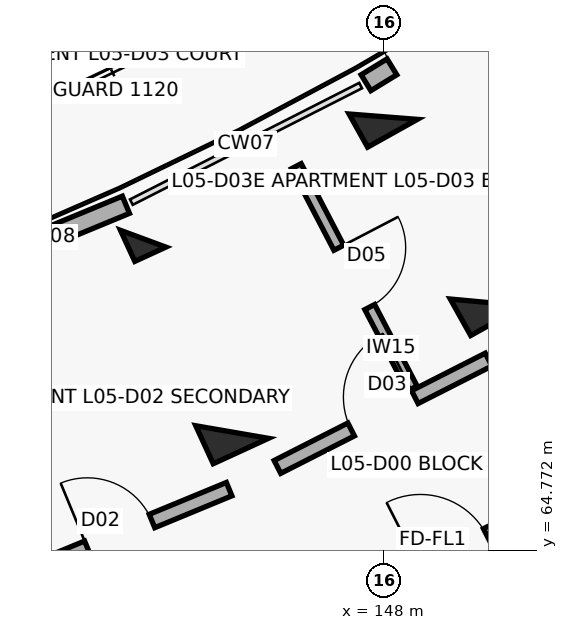
"""IFC4 building model, lengths in metres.
Left out: names, types, materials, properties, quantities, classifications, styles, units other than length and angle.
Written with IfcOpenShell. Run it as: python <this file> out.ifc"""

import sys

from ifc_helpers import new_model, si_unit, direction, frame, frame_2d, origin, origin_2d, place, context, subcontext, project, spatial, rectangle, extrude, element, fill, save


model = new_model("IFC4")
c1 = context("Model", 3, precision=1e-05, world=origin(), true_north=direction((0.0, 1.0)))
c2 = subcontext(c1, "Body", "Model", "MODEL_VIEW")
j1 = project(units=[si_unit("LENGTHUNIT", "METRE"), si_unit("PLANEANGLEUNIT", "RADIAN")], contexts=[c1])
p1 = place(None, origin())
s1 = spatial("IfcSite", under=j1, at=p1, CompositionType="ELEMENT")
p2 = place(p1, origin())
s2 = spatial("IfcBuilding", under=s1, at=p2, CompositionType="ELEMENT")
p3 = place(p2, frame((0.0, 0.0, 17.4)))
s3 = spatial("IfcBuildingStorey", under=s2, at=p3, CompositionType="ELEMENT", Elevation=17.4)
p4 = place(p3, frame((144.834, 68.868, 0.0), z_axis=(0.0, 0.0, 1.0), x_axis=(0.417867073801, -0.908508177527, 0.0)))
e1 = element("IfcColumn", 1, at=p4, inside=s3, PredefinedType="COLUMN", context=c2, shape_type="SweptSolid", body=[
    extrude(rectangle(XDim=0.45, YDim=0.45, at=origin_2d()), origin(), (0.0, 0.0, 1.0), 3.1),
])
p5 = place(p3, frame((146.004, 66.324, 0.0), z_axis=(0.0, 0.0, 1.0), x_axis=(0.417867073801, -0.908508177527, 0.0)))
e2 = element("IfcColumn", 2, at=p5, inside=s3, PredefinedType="COLUMN", context=c2, shape_type="SweptSolid", body=[
    extrude(rectangle(XDim=0.55, YDim=0.8, at=origin_2d()), origin(), (0.0, 0.0, 1.0), 3.1),
])
p6 = place(p3, frame((147.992, 70.474, 0.0), z_axis=(0.0, 0.0, 1.0), x_axis=(0.487859659139, -0.87292207727, 0.0)))
e3 = element("IfcColumn", 3, at=p6, inside=s3, PredefinedType="COLUMN", context=c2, shape_type="SweptSolid", body=[
    extrude(rectangle(XDim=0.5, YDim=0.75, at=origin_2d()), origin(), (0.0, 0.0, 1.0), 3.1),
])
p7 = place(p3, frame((149.358, 68.03, 0.0), z_axis=(0.0, 0.0, 1.0), x_axis=(0.487859659139, -0.87292207727, 0.0)))
e4 = element("IfcColumn", 4, at=p7, inside=s3, PredefinedType="COLUMN", context=c2, shape_type="SweptSolid", body=[
    extrude(rectangle(XDim=0.55, YDim=0.8, at=origin_2d()), origin(), (0.0, 0.0, 1.0), 3.1),
])
p8 = place(p3, frame((141.406, 67.992, 0.0), z_axis=(0.0, 0.0, 1.0), x_axis=(0.924221949388, 0.381855716561, 0.0)))
e5 = element("IfcWall", 5, at=p8, inside=s3, PredefinedType="SOLIDWALL", context=c2, shape_type="SweptSolid", body=[
    extrude(rectangle(XDim=3.463, YDim=0.245, at=frame_2d((1.732, 0.0))), origin(), (0.0, 0.0, 1.0), 2.25),
])
p9 = place(p8, frame((0.4, 0.0, 0.0)))
e6 = element("IfcOpeningElement", 6, at=p9, cuts=e5, PredefinedType="OPENING", context=c2, shape_type="SweptSolid", body=[
    extrude(rectangle(XDim=1.1, YDim=2.15, at=frame_2d((0.55, 1.075))), frame((0.0, 0.133, 0.0), z_axis=(0.0, -1.0, 0.0), x_axis=(1.0, 0.0, 0.0)), (0.0, 0.0, 1.0), 0.265),
])
p10 = place(p3, frame((147.765, 70.921, 0.0), z_axis=(0.0, 0.0, 1.0), x_axis=(0.85310231885, 0.521743647371, 0.0)))
e7 = element("IfcWall", 7, at=p10, inside=s3, PredefinedType="SOLIDWALL", context=c2, shape_type="SweptSolid", body=[
    extrude(rectangle(XDim=3.464, YDim=0.245, at=frame_2d((1.732, 0.0))), origin(), (0.0, 0.0, 1.0), 2.25),
])
p11 = place(p10, frame((0.4, 0.0, 0.0)))
e8 = element("IfcOpeningElement", 8, at=p11, cuts=e7, PredefinedType="OPENING", context=c2, shape_type="SweptSolid", body=[
    extrude(rectangle(XDim=1.1, YDim=2.15, at=frame_2d((0.55, 1.075))), frame((0.0, 0.133, 0.0), z_axis=(0.0, -1.0, 0.0), x_axis=(1.0, 0.0, 0.0)), (0.0, 0.0, 1.0), 0.265),
])
p12 = place(p3, frame((143.085, 64.383, 0.0), z_axis=(0.0, 0.0, 1.0), x_axis=(0.924213340202, 0.381876553081, 0.0)))
e9 = element("IfcWall", 9, at=p12, inside=s3, PredefinedType="SOLIDWALL", context=c2, shape_type="SweptSolid", body=[
    extrude(rectangle(XDim=3.116, YDim=0.19, at=frame_2d((1.558, 0.0))), origin(), (0.0, 0.0, 1.0), 2.08),
])
p13 = place(p12, frame((1.098, 0.0, 0.0)))
e10 = element("IfcOpeningElement", 10, at=p13, cuts=e9, PredefinedType="OPENING", context=c2, shape_type="SweptSolid", body=[
    extrude(rectangle(XDim=0.92, YDim=2.1, at=frame_2d((0.46, 1.05))), frame((0.0, 0.105, 0.0), z_axis=(0.0, -1.0, 0.0), x_axis=(1.0, 0.0, 0.0)), (0.0, 0.0, 1.0), 0.21),
])
p14 = place(p3, frame((147.457, 64.003, 0.0), z_axis=(0.0, 0.0, 1.0), x_axis=(0.891412167565, 0.45319349898, 0.0)))
e11 = element("IfcWall", 11, at=p14, inside=s3, PredefinedType="SOLIDWALL", context=c2, shape_type="SweptSolid", body=[
    extrude(rectangle(XDim=3.277, YDim=0.19, at=frame_2d((1.639, 0.0))), origin(), (0.0, 0.0, 1.0), 2.08),
])
p15 = place(p14, frame((1.148, 0.0, 0.0)))
e12 = element("IfcOpeningElement", 12, at=p15, cuts=e11, PredefinedType="OPENING", context=c2, shape_type="SweptSolid", body=[
    extrude(rectangle(XDim=0.98, YDim=2.15, at=frame_2d((0.49, 1.075))), frame((0.0, 0.105, 0.0), z_axis=(0.0, -1.0, 0.0), x_axis=(1.0, 0.0, 0.0)), (0.0, 0.0, 1.0), 0.21),
])
p16 = place(p3, frame((146.6, 65.865, 0.0), z_axis=(0.0, 0.0, 1.0), x_axis=(0.891414101388, 0.453189695212, 0.0)))
e13 = element("IfcWall", 13, at=p16, inside=s3, PredefinedType="SOLIDWALL", context=c2, shape_type="SweptSolid", body=[
    extrude(rectangle(XDim=3.116, YDim=0.19, at=frame_2d((1.558, 0.0))), origin(), (0.0, 0.0, 1.0), 2.08),
])
p17 = place(p16, frame((1.088, 0.0, 0.0)))
e14 = element("IfcOpeningElement", 14, at=p17, cuts=e13, PredefinedType="OPENING", context=c2, shape_type="SweptSolid", body=[
    extrude(rectangle(XDim=0.94, YDim=2.1, at=frame_2d((0.47, 1.05))), frame((0.0, 0.105, 0.0), z_axis=(0.0, -1.0, 0.0), x_axis=(1.0, 0.0, 0.0)), (0.0, 0.0, 1.0), 0.21),
])
p18 = place(p3, frame((146.849, 69.822, 0.0), z_axis=(0.0, 0.0, 1.0), x_axis=(0.462242343884, -0.886753638572, 0.0)))
e15 = element("IfcWall", 15, at=p18, inside=s3, PredefinedType="PARTITIONING", context=c2, shape_type="SweptSolid", body=[
    extrude(rectangle(XDim=3.3, YDim=0.145, at=frame_2d((1.65, 0.0))), origin(), (0.0, 0.0, 1.0), 2.08),
])
p19 = place(p18, frame((1.21, 0.0, 0.0)))
e16 = element("IfcOpeningElement", 16, at=p19, cuts=e15, PredefinedType="OPENING", context=c2, shape_type="SweptSolid", body=[
    extrude(rectangle(XDim=0.88, YDim=2.1, at=frame_2d((0.44, 1.05))), frame((0.0, 0.083, 0.0), z_axis=(0.0, -1.0, 0.0), x_axis=(1.0, 0.0, 0.0)), (0.0, 0.0, 1.0), 0.165),
])
p20 = place(p11, origin())
e17 = element("IfcDoor", 17, at=p20, inside=s3, OperationType="SINGLE_SWING_RIGHT", PredefinedType="DOOR", context=c2, shape_type="SweptSolid", body=[
    extrude(rectangle(XDim=1.1, YDim=2.15, at=frame_2d((0.55, 1.075))), frame((0.0, 0.025, 0.0), z_axis=(0.0, -1.0, 0.0), x_axis=(1.0, 0.0, 0.0)), (0.0, 0.0, 1.0), 0.05),
])
fill(e8, e17)
p21 = place(p13, origin())
e18 = element("IfcDoor", 18, at=p21, inside=s3, OperationType="SINGLE_SWING_LEFT", PredefinedType="DOOR", context=c2, shape_type="SweptSolid", body=[
    extrude(rectangle(XDim=0.92, YDim=2.1, at=frame_2d((0.46, 1.05))), frame((0.0, 0.025, 0.0), z_axis=(0.0, -1.0, 0.0), x_axis=(1.0, 0.0, 0.0)), (0.0, 0.0, 1.0), 0.05),
])
fill(e10, e18)
p22 = place(p15, origin())
e19 = element("IfcDoor", 19, at=p22, inside=s3, OperationType="SINGLE_SWING_LEFT", PredefinedType="DOOR", context=c2, shape_type="SweptSolid", body=[
    extrude(rectangle(XDim=0.98, YDim=2.15, at=frame_2d((0.49, 1.075))), frame((0.0, 0.025, 0.0), z_axis=(0.0, -1.0, 0.0), x_axis=(1.0, 0.0, 0.0)), (0.0, 0.0, 1.0), 0.05),
])
fill(e12, e19)
p23 = place(p17, origin())
e20 = element("IfcDoor", 20, at=p23, inside=s3, OperationType="SINGLE_SWING_RIGHT", PredefinedType="DOOR", context=c2, shape_type="SweptSolid", body=[
    extrude(rectangle(XDim=0.94, YDim=2.1, at=frame_2d((0.47, 1.05))), frame((0.0, 0.025, 0.0), z_axis=(0.0, -1.0, 0.0), x_axis=(1.0, 0.0, 0.0)), (0.0, 0.0, 1.0), 0.05),
])
fill(e14, e20)
p24 = place(p19, origin())
e21 = element("IfcDoor", 21, at=p24, inside=s3, OperationType="SINGLE_SWING_LEFT", PredefinedType="DOOR", context=c2, shape_type="SweptSolid", body=[
    extrude(rectangle(XDim=0.88, YDim=2.1, at=frame_2d((0.44, 1.05))), frame((0.0, 0.025, 0.0), z_axis=(0.0, -1.0, 0.0), x_axis=(1.0, 0.0, 0.0)), (0.0, 0.0, 1.0), 0.05),
])
fill(e16, e21)
save(model, sys.argv[1])
